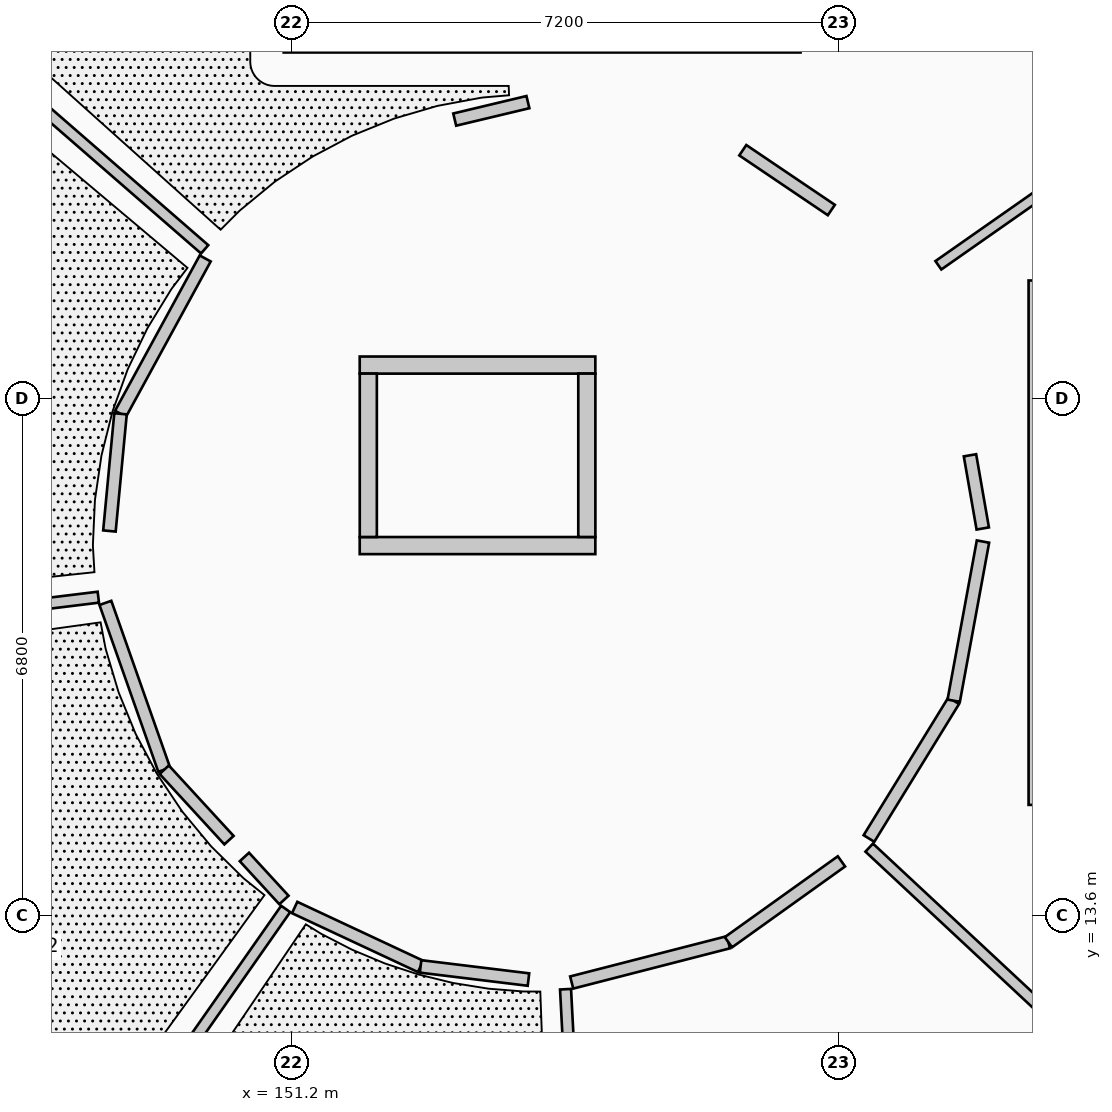
"""IFC4 building model, lengths in metres.
Left out: names, types, materials, properties, quantities, classifications, styles, units other than length and angle.
Written with IfcOpenShell. Run it as: python <this file> out.ifc"""

import sys

from ifc_helpers import new_model, si_unit, direction, frame, frame_2d, origin, origin_2d, place, context, subcontext, project, spatial, rectangle, extrude, element, fill, save


model = new_model("IFC4")
c1 = context("Model", 3, precision=1e-05, world=origin(), true_north=direction((0.0, 1.0)))
c2 = subcontext(c1, "Body", "Model", "MODEL_VIEW")
j1 = project(units=[si_unit("LENGTHUNIT", "METRE"), si_unit("PLANEANGLEUNIT", "RADIAN")], contexts=[c1])
p1 = place(None, origin())
s1 = spatial("IfcSite", under=j1, at=p1, CompositionType="ELEMENT")
p2 = place(p1, origin())
s2 = spatial("IfcBuilding", under=s1, at=p2, CompositionType="ELEMENT")
p3 = place(p2, frame((0.0, 0.0, 4.55)))
s3 = spatial("IfcBuildingStorey", under=s2, at=p3, CompositionType="ELEMENT", Elevation=4.55)
for number, where, z_axis, x_axis in (
    (1, (158.601, 22.601, 0.0), (0.0, 0.0, 1.0), (1.0, 0.0, 0.0)),
    (2, (150.399, 22.601, 0.0), (0.0, 0.0, 1.0), (1.0, 0.0, 0.0)),
    (3, (148.7, 18.5, 0.0), (0.0, 0.0, 1.0), (1.0, 0.0, 0.0)),
    (4, (150.399, 14.399, 0.0), (0.0, 0.0, 1.0), (1.0, 0.0, 0.0)),
    (5, (154.5, 12.7, 0.0), (0.0, 0.0, 1.0), (1.0, 0.0, 0.0)),
    (6, (158.601, 14.399, 0.0), (0.0, 0.0, 1.0), (1.0, 0.0, 0.0)),
):
    element("IfcColumn", number, at=place(p3, frame(where, z_axis=z_axis, x_axis=x_axis)), inside=s3, PredefinedType="COLUMN", context=c2, shape_type="SweptSolid", body=[
        extrude(rectangle(XDim=0.365, YDim=0.365, at=origin_2d()), origin(), (0.0, 0.0, 1.0), 4.2),
    ])
p4 = place(p3, frame((161.025, 21.95, 0.0), z_axis=(0.0, 0.0, 1.0), x_axis=(0.0, -1.0, 0.0)))
e7 = element("IfcWall", 7, at=p4, inside=s3, PredefinedType="SHEAR", context=c2, shape_type="SweptSolid", body=[
    extrude(rectangle(XDim=6.9, YDim=0.25, at=frame_2d((3.45, 0.0))), origin(), (0.0, 0.0, 1.0), 3.955),
])
p5 = place(p4, frame((0.43, 0.0, 0.0)))
e8 = element("IfcOpeningElement", 8, at=p5, cuts=e7, PredefinedType="OPENING", context=c2, shape_type="SweptSolid", body=[
    extrude(rectangle(XDim=1.1, YDim=2.15, at=frame_2d((0.55, 1.075))), frame((0.0, 0.135, 0.0), z_axis=(0.0, -1.0, 0.0), x_axis=(1.0, 0.0, 0.0)), (0.0, 0.0, 1.0), 0.27),
])
p6 = place(p3, frame((152.1, 18.462, 0.0), z_axis=(0.0, 0.0, 1.0), x_axis=(1.0, 0.0, 0.0)))
e9 = element("IfcWall", 9, at=p6, inside=s3, PredefinedType="SHEAR", context=c2, shape_type="SweptSolid", body=[
    extrude(rectangle(XDim=3.1, YDim=0.225, at=frame_2d((1.55, 0.0))), origin(), (0.0, 0.0, 1.0), 3.955),
])
p7 = place(p6, frame((0.95, 0.0, 0.0)))
e10 = element("IfcOpeningElement", 10, at=p7, cuts=e9, PredefinedType="OPENING", context=c2, shape_type="SweptSolid", body=[
    extrude(rectangle(XDim=1.2, YDim=2.2, at=frame_2d((0.6, 1.1))), frame((0.0, 0.123, 0.0), z_axis=(0.0, -1.0, 0.0), x_axis=(1.0, 0.0, 0.0)), (0.0, 0.0, 1.0), 0.245),
])
p8 = place(p3, frame((152.1, 20.837, 0.0), z_axis=(0.0, 0.0, 1.0), x_axis=(1.0, 0.0, 0.0)))
e11 = element("IfcWall", 11, at=p8, inside=s3, PredefinedType="SHEAR", context=c2, shape_type="SweptSolid", body=[
    extrude(rectangle(XDim=3.1, YDim=0.225, at=frame_2d((1.55, 0.0))), origin(), (0.0, 0.0, 1.0), 3.955),
])
for number, where, z_axis, x_axis in (
    (12, (152.213, 18.575, 0.0), (0.0, 0.0, 1.0), (0.0, 1.0, 0.0)),
    (13, (155.088, 18.575, 0.0), (0.0, 0.0, 1.0), (0.0, 1.0, 0.0)),
):
    element("IfcWall", number, at=place(p3, frame(where, z_axis=z_axis, x_axis=x_axis)), inside=s3, PredefinedType="SHEAR", context=c2, shape_type="SweptSolid", body=[
        extrude(rectangle(XDim=2.15, YDim=0.225, at=frame_2d((1.075, 0.0))), origin(), (0.0, 0.0, 1.0), 3.955),
    ])
p9 = place(p3, frame((150.06, 22.36, 0.0), z_axis=(0.0, 0.0, 1.0), x_axis=(-0.754707000712, 0.656061996366, 0.0)))
e14 = element("IfcWall", 14, at=p9, inside=s3, PredefinedType="PARTITIONING", context=c2, shape_type="SweptSolid", body=[
    extrude(rectangle(XDim=4.868, YDim=0.145, at=frame_2d((2.434, 0.0))), origin(), (0.0, 0.0, 1.0), 3.284),
])
p10 = place(p3, frame((148.661, 17.783, 0.0), z_axis=(0.0, 0.0, 1.0), x_axis=(-0.992549416304, -0.121842751918, 0.0)))
e15 = element("IfcWall", 15, at=p10, inside=s3, PredefinedType="PARTITIONING", context=c2, shape_type="SweptSolid", body=[
    extrude(rectangle(XDim=4.867, YDim=0.145, at=frame_2d((2.434, 0.0))), origin(), (0.0, 0.0, 1.0), 3.284),
])
p11 = place(p3, frame((151.126, 13.681, 0.0), z_axis=(0.0, 0.0, 1.0), x_axis=(-0.573579487823, -0.819149907617, 0.0)))
e16 = element("IfcWall", 16, at=p11, inside=s3, PredefinedType="PARTITIONING", context=c2, shape_type="SweptSolid", body=[
    extrude(rectangle(XDim=4.895, YDim=0.145, at=frame_2d((2.448, 0.0))), origin(), (0.0, 0.0, 1.0), 3.284),
])
p12 = place(p3, frame((154.808, 12.625, 0.0), z_axis=(0.0, 0.0, 1.0), x_axis=(0.05228807127, -0.998632043148, 0.0)))
e17 = element("IfcWall", 17, at=p12, inside=s3, PredefinedType="PARTITIONING", context=c2, shape_type="SweptSolid", body=[
    extrude(rectangle(XDim=4.875, YDim=0.145, at=frame_2d((2.437, 0.0))), origin(), (0.0, 0.0, 1.0), 3.284),
])
p13 = place(p3, frame((158.803, 14.488, 0.0), z_axis=(0.0, 0.0, 1.0), x_axis=(0.731337706655, -0.682015512158, 0.0)))
e18 = element("IfcWall", 18, at=p13, inside=s3, PredefinedType="PARTITIONING", context=c2, shape_type="SweptSolid", body=[
    extrude(rectangle(XDim=4.885, YDim=0.145, at=frame_2d((2.443, 0.0))), origin(), (0.0, 0.0, 1.0), 3.284),
])
p14 = place(p3, frame((159.713, 22.15, 0.0), z_axis=(0.0, 0.0, 1.0), x_axis=(0.819164362173, 0.573558844187, 0.0)))
e19 = element("IfcWall", 19, at=p14, inside=s3, PredefinedType="PLUMBINGWALL", context=c2, shape_type="SweptSolid", body=[
    extrude(rectangle(XDim=4.415, YDim=0.135, at=frame_2d((2.207, 0.0))), origin(), (0.0, 0.0, 1.0), 3.284),
])
p15 = place(p3, frame((154.313, 24.297, 0.0), z_axis=(0.0, 0.0, 1.0), x_axis=(-0.972586166784, -0.232542787849, 0.0)))
e20 = element("IfcWall", 20, at=p15, inside=s3, PredefinedType="PARTITIONING", context=c2, shape_type="SweptSolid", body=[
    extrude(rectangle(XDim=0.99, YDim=0.165, at=frame_2d((0.495, 0.0))), origin(), (0.0, 0.0, 1.0), 3.284),
])
p16 = place(p3, frame((150.067, 22.24, 0.0), z_axis=(0.0, 0.0, 1.0), x_axis=(-0.478565523384, -0.878051843474, 0.0)))
e21 = element("IfcWall", 21, at=p16, inside=s3, PredefinedType="PARTITIONING", context=c2, shape_type="SweptSolid", body=[
    extrude(rectangle(XDim=2.328, YDim=0.165, at=frame_2d((1.164, 0.0))), origin(), (0.0, 0.0, 1.0), 3.284),
])
p17 = place(p16, frame((0.579, 0.0, 0.0)))
e22 = element("IfcOpeningElement", 22, at=p17, cuts=e21, PredefinedType="OPENING", context=c2, shape_type="SweptSolid", body=[
    extrude(rectangle(XDim=1.17, YDim=2.24, at=frame_2d((0.585, 1.12))), frame((0.0, 0.093, 0.0), z_axis=(0.0, -1.0, 0.0), x_axis=(1.0, 0.0, 0.0)), (0.0, 0.0, 1.0), 0.185),
])
p18 = place(p3, frame((148.953, 20.196, 0.0), z_axis=(0.0, 0.0, 1.0), x_axis=(-0.094258636882, -0.995547743392, 0.0)))
e23 = element("IfcWall", 23, at=p18, inside=s3, PredefinedType="PARTITIONING", context=c2, shape_type="SweptSolid", body=[
    extrude(rectangle(XDim=1.549, YDim=0.165, at=frame_2d((0.774, 0.0))), origin(), (0.0, 0.0, 1.0), 3.284),
])
p19 = place(p3, frame((148.754, 17.708, 0.0), z_axis=(0.0, 0.0, 1.0), x_axis=(0.332606133603, -0.943065830093, 0.0)))
e24 = element("IfcWall", 24, at=p19, inside=s3, PredefinedType="PARTITIONING", context=c2, shape_type="SweptSolid", body=[
    extrude(rectangle(XDim=2.328, YDim=0.165, at=frame_2d((1.164, 0.0))), origin(), (0.0, 0.0, 1.0), 3.284),
])
p20 = place(p19, frame((0.569, 0.0, 0.0)))
e25 = element("IfcOpeningElement", 25, at=p20, cuts=e24, PredefinedType="OPENING", context=c2, shape_type="SweptSolid", body=[
    extrude(rectangle(XDim=1.19, YDim=2.26, at=frame_2d((0.595, 1.13))), frame((0.0, 0.093, 0.0), z_axis=(0.0, -1.0, 0.0), x_axis=(1.0, 0.0, 0.0)), (0.0, 0.0, 1.0), 0.185),
])
p21 = place(p3, frame((149.528, 15.513, 0.0), z_axis=(0.0, 0.0, 1.0), x_axis=(0.676611080709, -0.736340577085, 0.0)))
e26 = element("IfcWall", 26, at=p21, inside=s3, PredefinedType="PARTITIONING", context=c2, shape_type="SweptSolid", body=[
    extrude(rectangle(XDim=1.259, YDim=0.165, at=frame_2d((0.629, 0.0))), origin(), (0.0, 0.0, 1.0), 3.284),
])
p22 = place(p3, frame((150.583, 14.365, 0.0), z_axis=(0.0, 0.0, 1.0), x_axis=(0.676615979647, -0.736336075503, 0.0)))
e27 = element("IfcWall", 27, at=p22, inside=s3, PredefinedType="PARTITIONING", context=c2, shape_type="SweptSolid", body=[
    extrude(rectangle(XDim=0.769, YDim=0.165, at=frame_2d((0.384, 0.0))), origin(), (0.0, 0.0, 1.0), 3.284),
])
p23 = place(p3, frame((151.244, 13.7, 0.0), z_axis=(0.0, 0.0, 1.0), x_axis=(0.905838456469, -0.423623288763, 0.0)))
e28 = element("IfcWall", 28, at=p23, inside=s3, PredefinedType="PARTITIONING", context=c2, shape_type="SweptSolid", body=[
    extrude(rectangle(XDim=1.829, YDim=0.165, at=frame_2d((0.915, 0.0))), origin(), (0.0, 0.0, 1.0), 3.284),
])
p24 = place(p23, frame((0.31, 0.0, 0.0)))
e29 = element("IfcOpeningElement", 29, at=p24, cuts=e28, PredefinedType="OPENING", context=c2, shape_type="SweptSolid", body=[
    extrude(rectangle(XDim=1.21, YDim=2.16, at=frame_2d((0.605, 1.08))), frame((0.0, 0.093, 0.0), z_axis=(0.0, -1.0, 0.0), x_axis=(1.0, 0.0, 0.0)), (0.0, 0.0, 1.0), 0.185),
])
p25 = place(p3, frame((152.901, 12.925, 0.0), z_axis=(0.0, 0.0, 1.0), x_axis=(0.992643875507, -0.12107079094, 0.0)))
e30 = element("IfcWall", 30, at=p25, inside=s3, PredefinedType="PARTITIONING", context=c2, shape_type="SweptSolid", body=[
    extrude(rectangle(XDim=1.43, YDim=0.165, at=frame_2d((0.715, 0.0))), origin(), (0.0, 0.0, 1.0), 3.284),
])
p26 = place(p3, frame((154.889, 12.713, 0.0), z_axis=(0.0, 0.0, 1.0), x_axis=(0.968515845244, 0.248951918071, 0.0)))
e31 = element("IfcWall", 31, at=p26, inside=s3, PredefinedType="PARTITIONING", context=c2, shape_type="SweptSolid", body=[
    extrude(rectangle(XDim=2.129, YDim=0.165, at=frame_2d((1.064, 0.0))), origin(), (0.0, 0.0, 1.0), 3.284),
])
p27 = place(p26, frame((0.444, 0.0, 0.0)))
e32 = element("IfcOpeningElement", 32, at=p27, cuts=e31, PredefinedType="OPENING", context=c2, shape_type="SweptSolid", body=[
    extrude(rectangle(XDim=1.24, YDim=2.22, at=frame_2d((0.62, 1.11))), frame((0.0, 0.093, 0.0), z_axis=(0.0, -1.0, 0.0), x_axis=(1.0, 0.0, 0.0)), (0.0, 0.0, 1.0), 0.185),
])
p28 = place(p3, frame((156.951, 13.243, 0.0), z_axis=(0.0, 0.0, 1.0), x_axis=(0.813273111974, 0.581882157606, 0.0)))
e33 = element("IfcWall", 33, at=p28, inside=s3, PredefinedType="PARTITIONING", context=c2, shape_type="SweptSolid", body=[
    extrude(rectangle(XDim=1.828, YDim=0.165, at=frame_2d((0.914, 0.0))), origin(), (0.0, 0.0, 1.0), 3.284),
])
p29 = place(p3, frame((158.8, 14.608, 0.0), z_axis=(0.0, 0.0, 1.0), x_axis=(0.523860609665, 0.851804004241, 0.0)))
e34 = element("IfcWall", 34, at=p29, inside=s3, PredefinedType="PARTITIONING", context=c2, shape_type="SweptSolid", body=[
    extrude(rectangle(XDim=2.128, YDim=0.165, at=frame_2d((1.064, 0.0))), origin(), (0.0, 0.0, 1.0), 3.284),
])
p30 = place(p29, frame((0.424, 0.0, 0.0)))
e35 = element("IfcOpeningElement", 35, at=p30, cuts=e34, PredefinedType="OPENING", context=c2, shape_type="SweptSolid", body=[
    extrude(rectangle(XDim=1.28, YDim=2.3, at=frame_2d((0.64, 1.15))), frame((0.0, 0.093, 0.0), z_axis=(0.0, -1.0, 0.0), x_axis=(1.0, 0.0, 0.0)), (0.0, 0.0, 1.0), 0.185),
])
p31 = place(p3, frame((159.915, 16.421, 0.0), z_axis=(0.0, 0.0, 1.0), x_axis=(0.180832621822, 0.983513885456, 0.0)))
e36 = element("IfcWall", 36, at=p31, inside=s3, PredefinedType="PARTITIONING", context=c2, shape_type="SweptSolid", body=[
    extrude(rectangle(XDim=2.129, YDim=0.165, at=frame_2d((1.064, 0.0))), origin(), (0.0, 0.0, 1.0), 3.284),
])
p32 = place(p3, frame((160.297, 18.687, 0.0), z_axis=(0.0, 0.0, 1.0), x_axis=(-0.172089509946, 0.985081316728, 0.0)))
e37 = element("IfcWall", 37, at=p32, inside=s3, PredefinedType="PARTITIONING", context=c2, shape_type="SweptSolid", body=[
    extrude(rectangle(XDim=0.978, YDim=0.165, at=frame_2d((0.489, 0.0))), origin(), (0.0, 0.0, 1.0), 3.284),
])
p33 = place(p3, frame((158.305, 22.877, 0.0), z_axis=(0.0, 0.0, 1.0), x_axis=(-0.82861509232, 0.559818746362, 0.0)))
e38 = element("IfcWall", 38, at=p33, inside=s3, PredefinedType="PARTITIONING", context=c2, shape_type="SweptSolid", body=[
    extrude(rectangle(XDim=1.406, YDim=0.165, at=frame_2d((0.703, 0.0))), origin(), (0.0, 0.0, 1.0), 3.284),
])
p34 = place(p33, frame((0.233, 0.0, 0.0)))
e39 = element("IfcOpeningElement", 39, at=p34, cuts=e38, PredefinedType="OPENING", context=c2, shape_type="SweptSolid", body=[
    extrude(rectangle(XDim=0.94, YDim=2.1, at=frame_2d((0.47, 1.05))), frame((0.0, 0.093, 0.0), z_axis=(0.0, -1.0, 0.0), x_axis=(1.0, 0.0, 0.0)), (0.0, 0.0, 1.0), 0.185),
])
p35 = place(p7, origin())
e40 = element("IfcDoor", 40, at=p35, inside=s3, OperationType="DOUBLE_DOOR_SLIDING", PredefinedType="DOOR", context=c2, shape_type="SweptSolid", body=[
    extrude(rectangle(XDim=1.2, YDim=2.2, at=frame_2d((0.6, 1.1))), frame((0.0, 0.025, 0.0), z_axis=(0.0, -1.0, 0.0), x_axis=(1.0, 0.0, 0.0)), (0.0, 0.0, 1.0), 0.05),
])
fill(e10, e40)
p36 = place(p17, origin())
e41 = element("IfcDoor", 41, at=p36, inside=s3, OperationType="SINGLE_SWING_RIGHT", PredefinedType="DOOR", context=c2, shape_type="SweptSolid", body=[
    extrude(rectangle(XDim=1.17, YDim=2.24, at=frame_2d((0.585, 1.12))), frame((0.0, 0.025, 0.0), z_axis=(0.0, -1.0, 0.0), x_axis=(1.0, 0.0, 0.0)), (0.0, 0.0, 1.0), 0.05),
])
fill(e22, e41)
p37 = place(p20, origin())
e42 = element("IfcDoor", 42, at=p37, inside=s3, OperationType="SINGLE_SWING_LEFT", PredefinedType="DOOR", context=c2, shape_type="SweptSolid", body=[
    extrude(rectangle(XDim=1.19, YDim=2.26, at=frame_2d((0.595, 1.13))), frame((0.0, 0.025, 0.0), z_axis=(0.0, -1.0, 0.0), x_axis=(1.0, 0.0, 0.0)), (0.0, 0.0, 1.0), 0.05),
])
fill(e25, e42)
p38 = place(p24, origin())
e43 = element("IfcDoor", 43, at=p38, inside=s3, OperationType="SINGLE_SWING_RIGHT", PredefinedType="DOOR", context=c2, shape_type="SweptSolid", body=[
    extrude(rectangle(XDim=1.21, YDim=2.16, at=frame_2d((0.605, 1.08))), frame((0.0, 0.025, 0.0), z_axis=(0.0, -1.0, 0.0), x_axis=(1.0, 0.0, 0.0)), (0.0, 0.0, 1.0), 0.05),
])
fill(e29, e43)
p39 = place(p27, origin())
e44 = element("IfcDoor", 44, at=p39, inside=s3, OperationType="SINGLE_SWING_LEFT", PredefinedType="DOOR", context=c2, shape_type="SweptSolid", body=[
    extrude(rectangle(XDim=1.24, YDim=2.22, at=frame_2d((0.62, 1.11))), frame((0.0, 0.025, 0.0), z_axis=(0.0, -1.0, 0.0), x_axis=(1.0, 0.0, 0.0)), (0.0, 0.0, 1.0), 0.05),
])
fill(e32, e44)
p40 = place(p30, origin())
e45 = element("IfcDoor", 45, at=p40, inside=s3, OperationType="SINGLE_SWING_RIGHT", PredefinedType="DOOR", context=c2, shape_type="SweptSolid", body=[
    extrude(rectangle(XDim=1.28, YDim=2.3, at=frame_2d((0.64, 1.15))), frame((0.0, 0.025, 0.0), z_axis=(0.0, -1.0, 0.0), x_axis=(1.0, 0.0, 0.0)), (0.0, 0.0, 1.0), 0.05),
])
fill(e35, e45)
p41 = place(p34, origin())
e46 = element("IfcDoor", 46, at=p41, inside=s3, OperationType="SINGLE_SWING_LEFT", PredefinedType="DOOR", context=c2, shape_type="SweptSolid", body=[
    extrude(rectangle(XDim=0.94, YDim=2.1, at=frame_2d((0.47, 1.05))), frame((0.0, 0.025, 0.0), z_axis=(0.0, -1.0, 0.0), x_axis=(1.0, 0.0, 0.0)), (0.0, 0.0, 1.0), 0.05),
])
fill(e39, e46)
save(model, sys.argv[1])
